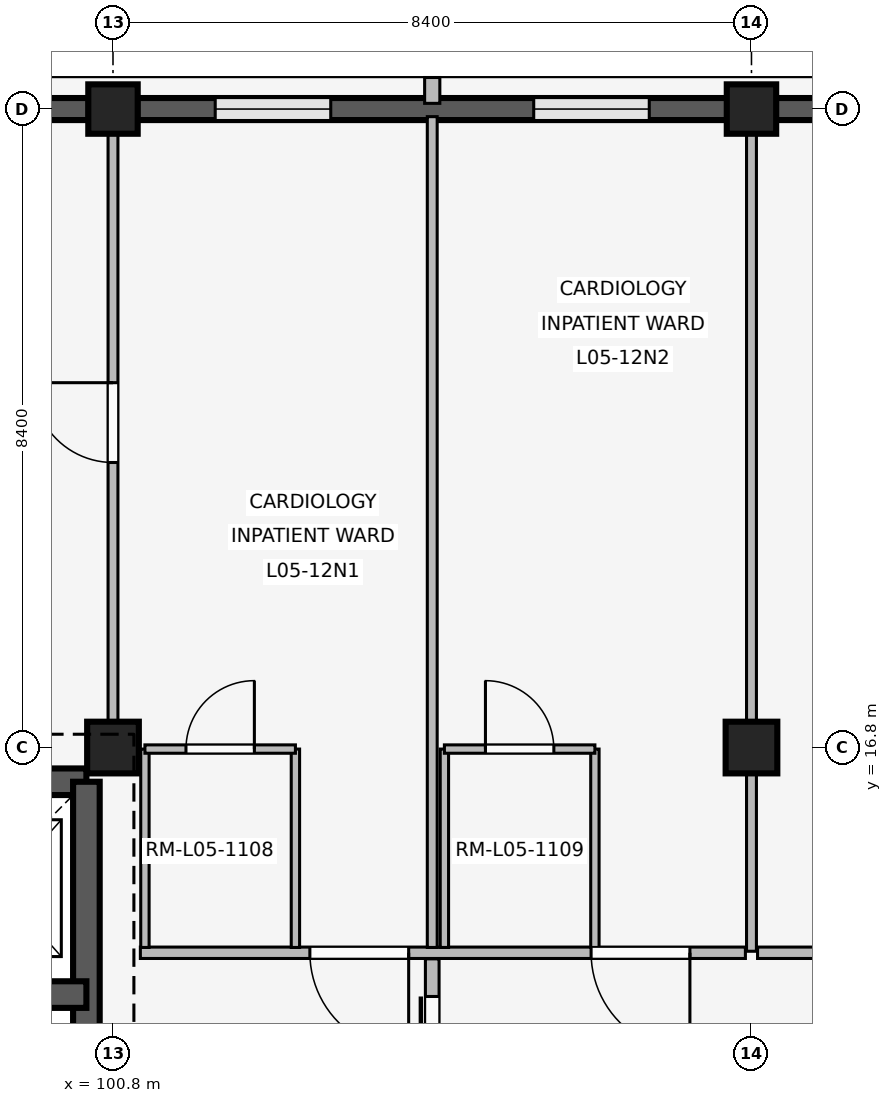
"""IFC4 building model, lengths in metres.
Left out: names, types, materials, properties, quantities, classifications, styles, units other than length and angle.
Written with IfcOpenShell. Run it as: python <this file> out.ifc"""

import sys

from ifc_helpers import new_model, si_unit, direction, frame, frame_2d, origin, origin_2d, place, context, subcontext, project, spatial, rectangle, extrude, element, fill, save


model = new_model("IFC4")
c1 = context("Model", 3, precision=1e-05, world=origin(), true_north=direction((0.0, 1.0)))
c2 = subcontext(c1, "Body", "Model", "MODEL_VIEW")
j1 = project(units=[si_unit("LENGTHUNIT", "METRE"), si_unit("PLANEANGLEUNIT", "RADIAN")], contexts=[c1])
p1 = place(None, origin())
s1 = spatial("IfcSite", under=j1, at=p1, CompositionType="ELEMENT")
p2 = place(p1, origin())
s2 = spatial("IfcBuilding", under=s1, at=p2, CompositionType="ELEMENT")
p3 = place(p2, frame((0.0, 0.0, 20.4)))
s3 = spatial("IfcBuildingStorey", under=s2, at=p3, CompositionType="ELEMENT", Elevation=20.4)
p4 = place(p3, frame((100.8, 16.8, 0.0), z_axis=(0.0, 0.0, 1.0), x_axis=(1.0, 0.0, 0.0)))
e1 = element("IfcColumn", 1, at=p4, inside=s3, PredefinedType="COLUMN", context=c2, shape_type="SweptSolid", body=[
    extrude(rectangle(XDim=0.68, YDim=0.68, at=origin_2d()), origin(), (0.0, 0.0, 1.0), 4.2),
])
p5 = place(p3, frame((100.8, 25.2, 0.0), z_axis=(0.0, 0.0, 1.0), x_axis=(1.0, 0.0, 0.0)))
e2 = element("IfcColumn", 2, at=p5, inside=s3, PredefinedType="COLUMN", context=c2, shape_type="SweptSolid", body=[
    extrude(rectangle(XDim=0.65, YDim=0.65, at=origin_2d()), origin(), (0.0, 0.0, 1.0), 4.2),
])
p6 = place(p3, frame((109.2, 16.8, 0.0), z_axis=(0.0, 0.0, 1.0), x_axis=(1.0, 0.0, 0.0)))
e3 = element("IfcColumn", 3, at=p6, inside=s3, PredefinedType="COLUMN", context=c2, shape_type="SweptSolid", body=[
    extrude(rectangle(XDim=0.68, YDim=0.68, at=origin_2d()), origin(), (0.0, 0.0, 1.0), 4.2),
])
p7 = place(p3, frame((109.2, 25.2, 0.0), z_axis=(0.0, 0.0, 1.0), x_axis=(1.0, 0.0, 0.0)))
e4 = element("IfcColumn", 4, at=p7, inside=s3, PredefinedType="COLUMN", context=c2, shape_type="SweptSolid", body=[
    extrude(rectangle(XDim=0.65, YDim=0.65, at=origin_2d()), origin(), (0.0, 0.0, 1.0), 4.2),
])
p8 = place(p3, frame((92.72, 25.2, 0.0), z_axis=(0.0, 0.0, 1.0), x_axis=(1.0, 0.0, 0.0)))
e5 = element("IfcWall", 5, at=p8, inside=s3, PredefinedType="SOLIDWALL", context=c2, shape_type="SweptSolid", body=[
    extrude(rectangle(XDim=7.76, YDim=0.29, at=frame_2d((3.88, 0.0))), origin(), (0.0, 0.0, 1.0), 3.34),
])
p9 = place(p8, frame((0.985, 0.0, 0.85)))
e6 = element("IfcOpeningElement", 6, at=p9, cuts=e5, PredefinedType="OPENING", context=c2, shape_type="SweptSolid", body=[
    extrude(rectangle(XDim=1.6, YDim=1.65, at=frame_2d((0.8, 0.825))), frame((0.0, 0.155, 0.0), z_axis=(0.0, -1.0, 0.0), x_axis=(1.0, 0.0, 0.0)), (0.0, 0.0, 1.0), 0.31),
])
p10 = place(p8, frame((5.175, 0.0, 0.85)))
e7 = element("IfcOpeningElement", 7, at=p10, cuts=e5, PredefinedType="OPENING", context=c2, shape_type="SweptSolid", body=[
    extrude(rectangle(XDim=1.6, YDim=1.65, at=frame_2d((0.8, 0.825))), frame((0.0, 0.155, 0.0), z_axis=(0.0, -1.0, 0.0), x_axis=(1.0, 0.0, 0.0)), (0.0, 0.0, 1.0), 0.31),
])
p11 = place(p3, frame((101.12, 25.2, 0.0), z_axis=(0.0, 0.0, 1.0), x_axis=(1.0, 0.0, 0.0)))
e8 = element("IfcWall", 8, at=p11, inside=s3, PredefinedType="SOLIDWALL", context=c2, shape_type="SweptSolid", body=[
    extrude(rectangle(XDim=7.76, YDim=0.29, at=frame_2d((3.88, 0.0))), origin(), (0.0, 0.0, 1.0), 3.34),
])
p12 = place(p11, frame((1.025, 0.0, 0.85)))
e9 = element("IfcOpeningElement", 9, at=p12, cuts=e8, PredefinedType="OPENING", context=c2, shape_type="SweptSolid", body=[
    extrude(rectangle(XDim=1.52, YDim=1.65, at=frame_2d((0.76, 0.825))), frame((0.0, 0.155, 0.0), z_axis=(0.0, -1.0, 0.0), x_axis=(1.0, 0.0, 0.0)), (0.0, 0.0, 1.0), 0.31),
])
p13 = place(p11, frame((5.215, 0.0, 0.85)))
e10 = element("IfcOpeningElement", 10, at=p13, cuts=e8, PredefinedType="OPENING", context=c2, shape_type="SweptSolid", body=[
    extrude(rectangle(XDim=1.52, YDim=1.65, at=frame_2d((0.76, 0.825))), frame((0.0, 0.155, 0.0), z_axis=(0.0, -1.0, 0.0), x_axis=(1.0, 0.0, 0.0)), (0.0, 0.0, 1.0), 0.31),
])
p14 = place(p3, frame((105.0, 25.275, 0.0), z_axis=(0.0, 0.0, 1.0), x_axis=(0.0, 1.0, 0.0)))
e11 = element("IfcWall", 11, at=p14, inside=s3, PredefinedType="ELEMENTEDWALL", context=c2, shape_type="SweptSolid", body=[
    extrude(rectangle(XDim=0.34, YDim=0.2, at=frame_2d((0.17, 0.0))), origin(), (0.0, 0.0, 1.0), 3.32),
])
p15 = place(p3, frame((109.52, 25.2, 0.0), z_axis=(0.0, 0.0, 1.0), x_axis=(1.0, 0.0, 0.0)))
e12 = element("IfcWall", 12, at=p15, inside=s3, PredefinedType="SOLIDWALL", context=c2, shape_type="SweptSolid", body=[
    extrude(rectangle(XDim=7.76, YDim=0.29, at=frame_2d((3.88, 0.0))), origin(), (0.0, 0.0, 1.0), 3.34),
])
p16 = place(p15, frame((1.11, 0.0, 0.85)))
e13 = element("IfcOpeningElement", 13, at=p16, cuts=e12, PredefinedType="OPENING", context=c2, shape_type="SweptSolid", body=[
    extrude(rectangle(XDim=1.35, YDim=1.55, at=frame_2d((0.675, 0.775))), frame((0.0, 0.155, 0.0), z_axis=(0.0, -1.0, 0.0), x_axis=(1.0, 0.0, 0.0)), (0.0, 0.0, 1.0), 0.31),
])
p17 = place(p15, frame((5.3, 0.0, 0.85)))
e14 = element("IfcOpeningElement", 14, at=p17, cuts=e12, PredefinedType="OPENING", context=c2, shape_type="SweptSolid", body=[
    extrude(rectangle(XDim=1.35, YDim=1.55, at=frame_2d((0.675, 0.775))), frame((0.0, 0.155, 0.0), z_axis=(0.0, -1.0, 0.0), x_axis=(1.0, 0.0, 0.0)), (0.0, 0.0, 1.0), 0.31),
])
p18 = place(p3, frame((92.95, 16.35, 0.0), z_axis=(0.0, 0.0, 1.0), x_axis=(1.0, 0.0, 0.0)))
e15 = element("IfcWall", 15, at=p18, inside=s3, PredefinedType="SHEAR", context=c2, shape_type="SweptSolid", body=[
    extrude(rectangle(XDim=7.5, YDim=0.35, at=frame_2d((3.75, 0.0))), origin(), (0.0, 0.0, 1.0), 3.92),
])
p19 = place(p3, frame((100.45, 8.8, 0.0), z_axis=(0.0, 0.0, 1.0), x_axis=(0.0, 1.0, 0.0)))
e16 = element("IfcWall", 16, at=p19, inside=s3, PredefinedType="SHEAR", context=c2, shape_type="SweptSolid", body=[
    extrude(rectangle(XDim=7.55, YDim=0.35, at=frame_2d((3.775, 0.0))), origin(), (0.0, 0.0, 1.0), 3.92),
])
p20 = place(p19, frame((2.4, 0.0, 0.0)))
e17 = element("IfcOpeningElement", 17, at=p20, cuts=e16, PredefinedType="OPENING", context=c2, shape_type="SweptSolid", body=[
    extrude(rectangle(XDim=1.2, YDim=2.2, at=frame_2d((0.6, 1.1))), frame((0.0, 0.185, 0.0), z_axis=(0.0, -1.0, 0.0), x_axis=(1.0, 0.0, 0.0)), (0.0, 0.0, 1.0), 0.37),
])
p21 = place(p3, frame((96.65, 13.55, 0.0), z_axis=(0.0, 0.0, 1.0), x_axis=(1.0, 0.0, 0.0)))
e18 = element("IfcWall", 18, at=p21, inside=s3, PredefinedType="SHEAR", context=c2, shape_type="SweptSolid", body=[
    extrude(rectangle(XDim=3.8, YDim=0.35, at=frame_2d((1.9, 0.0))), origin(), (0.0, 0.0, 1.0), 3.92),
])
p22 = place(p21, frame((0.32, 0.0, 0.0)))
e19 = element("IfcOpeningElement", 19, at=p22, cuts=e18, PredefinedType="OPENING", context=c2, shape_type="SweptSolid", body=[
    extrude(rectangle(XDim=1.4, YDim=2.25, at=frame_2d((0.7, 1.125))), frame((0.0, 0.185, 0.0), z_axis=(0.0, -1.0, 0.0), x_axis=(1.0, 0.0, 0.0)), (0.0, 0.0, 1.0), 0.37),
])
p23 = place(p21, frame((2.04, 0.0, 0.0)))
e20 = element("IfcOpeningElement", 20, at=p23, cuts=e18, PredefinedType="OPENING", context=c2, shape_type="SweptSolid", body=[
    extrude(rectangle(XDim=1.1, YDim=2.15, at=frame_2d((0.55, 1.075))), frame((0.0, 0.185, 0.0), z_axis=(0.0, -1.0, 0.0), x_axis=(1.0, 0.0, 0.0)), (0.0, 0.0, 1.0), 0.37),
])
p24 = place(p3, frame((100.8, 17.15, 0.0), z_axis=(0.0, 0.0, 1.0), x_axis=(0.0, 1.0, 0.0)))
e21 = element("IfcWall", 21, at=p24, inside=s3, PredefinedType="PARTITIONING", context=c2, shape_type="SweptSolid", body=[
    extrude(rectangle(XDim=7.91, YDim=0.13, at=frame_2d((3.955, 0.0))), origin(), (0.0, 0.0, 1.0), 3.32),
])
p25 = place(p24, frame((3.4, 0.0, 0.0)))
e22 = element("IfcOpeningElement", 22, at=p25, cuts=e21, PredefinedType="OPENING", context=c2, shape_type="SweptSolid", body=[
    extrude(rectangle(XDim=1.05, YDim=2.2, at=frame_2d((0.525, 1.1))), frame((0.0, 0.075, 0.0), z_axis=(0.0, -1.0, 0.0), x_axis=(1.0, 0.0, 0.0)), (0.0, 0.0, 1.0), 0.15),
])
p26 = place(p3, frame((109.12, 14.1, 0.0), z_axis=(0.0, 0.0, 1.0), x_axis=(-1.0, 0.0, 0.0)))
e23 = element("IfcWall", 23, at=p26, inside=s3, PredefinedType="PARTITIONING", context=c2, shape_type="SweptSolid", body=[
    extrude(rectangle(XDim=7.96, YDim=0.15, at=frame_2d((3.98, 0.0))), origin(), (0.0, 0.0, 1.0), 3.32),
])
p27 = place(p26, frame((0.73, 0.0, 0.0)))
e24 = element("IfcOpeningElement", 24, at=p27, cuts=e23, PredefinedType="OPENING", context=c2, shape_type="SweptSolid", body=[
    extrude(rectangle(XDim=1.3, YDim=2.25, at=frame_2d((0.65, 1.125))), frame((0.0, 0.085, 0.0), z_axis=(0.0, -1.0, 0.0), x_axis=(1.0, 0.0, 0.0)), (0.0, 0.0, 1.0), 0.17),
])
p28 = place(p26, frame((4.43, 0.0, 0.0)))
e25 = element("IfcOpeningElement", 25, at=p28, cuts=e23, PredefinedType="OPENING", context=c2, shape_type="SweptSolid", body=[
    extrude(rectangle(XDim=1.3, YDim=2.25, at=frame_2d((0.65, 1.125))), frame((0.0, 0.085, 0.0), z_axis=(0.0, -1.0, 0.0), x_axis=(1.0, 0.0, 0.0)), (0.0, 0.0, 1.0), 0.17),
])
p29 = place(p3, frame((105.0, 14.17, 0.0), z_axis=(0.0, 0.0, 1.0), x_axis=(0.0, 1.0, 0.0)))
e26 = element("IfcWall", 26, at=p29, inside=s3, PredefinedType="PARTITIONING", context=c2, shape_type="SweptSolid", body=[
    extrude(rectangle(XDim=10.93, YDim=0.13, at=frame_2d((5.465, 0.0))), origin(), (0.0, 0.0, 1.0), 3.32),
])
for number, where, z_axis, x_axis in (
    (27, (101.22, 14.17, 0.0), (0.0, 0.0, 1.0), (0.0, 1.0, 0.0)),
    (28, (103.2, 14.17, 0.0), (0.0, 0.0, 1.0), (0.0, 1.0, 0.0)),
):
    element("IfcWall", number, at=place(p3, frame(where, z_axis=z_axis, x_axis=x_axis)), inside=s3, PredefinedType="PARTITIONING", context=c2, shape_type="SweptSolid", body=[
        extrude(rectangle(XDim=2.61, YDim=0.11, at=frame_2d((1.305, 0.0))), origin(), (0.0, 0.0, 1.0), 3.32),
    ])
p30 = place(p3, frame((101.22, 16.78, 0.0), z_axis=(0.0, 0.0, 1.0), x_axis=(1.0, 0.0, 0.0)))
e29 = element("IfcWall", 29, at=p30, inside=s3, PredefinedType="PARTITIONING", context=c2, shape_type="SweptSolid", body=[
    extrude(rectangle(XDim=1.98, YDim=0.11, at=frame_2d((0.99, 0.0))), origin(), (0.0, 0.0, 1.0), 3.32),
])
p31 = place(p30, frame((0.54, 0.0, 0.0)))
e30 = element("IfcOpeningElement", 30, at=p31, cuts=e29, PredefinedType="OPENING", context=c2, shape_type="SweptSolid", body=[
    extrude(rectangle(XDim=0.9, YDim=2.1, at=frame_2d((0.45, 1.05))), frame((0.0, 0.065, 0.0), z_axis=(0.0, -1.0, 0.0), x_axis=(1.0, 0.0, 0.0)), (0.0, 0.0, 1.0), 0.13),
])
for number, where, z_axis, x_axis in (
    (31, (105.16, 14.17, 0.0), (0.0, 0.0, 1.0), (0.0, 1.0, 0.0)),
    (32, (107.14, 14.17, 0.0), (0.0, 0.0, 1.0), (0.0, 1.0, 0.0)),
):
    element("IfcWall", number, at=place(p3, frame(where, z_axis=z_axis, x_axis=x_axis)), inside=s3, PredefinedType="PARTITIONING", context=c2, shape_type="SweptSolid", body=[
        extrude(rectangle(XDim=2.61, YDim=0.11, at=frame_2d((1.305, 0.0))), origin(), (0.0, 0.0, 1.0), 3.32),
    ])
p32 = place(p3, frame((105.16, 16.78, 0.0), z_axis=(0.0, 0.0, 1.0), x_axis=(1.0, 0.0, 0.0)))
e33 = element("IfcWall", 33, at=p32, inside=s3, PredefinedType="PARTITIONING", context=c2, shape_type="SweptSolid", body=[
    extrude(rectangle(XDim=1.98, YDim=0.11, at=frame_2d((0.99, 0.0))), origin(), (0.0, 0.0, 1.0), 3.32),
])
p33 = place(p32, frame((0.54, 0.0, 0.0)))
e34 = element("IfcOpeningElement", 34, at=p33, cuts=e33, PredefinedType="OPENING", context=c2, shape_type="SweptSolid", body=[
    extrude(rectangle(XDim=0.9, YDim=2.1, at=frame_2d((0.45, 1.05))), frame((0.0, 0.065, 0.0), z_axis=(0.0, -1.0, 0.0), x_axis=(1.0, 0.0, 0.0)), (0.0, 0.0, 1.0), 0.13),
])
p34 = place(p3, frame((105.0, 11.18, 0.0), z_axis=(0.0, 0.0, 1.0), x_axis=(0.0, 1.0, 0.0)))
e35 = element("IfcWall", 35, at=p34, inside=s3, PredefinedType="PARTITIONING", context=c2, shape_type="SweptSolid", body=[
    extrude(rectangle(XDim=2.84, YDim=0.18, at=frame_2d((1.42, 0.0))), origin(), (0.0, 0.0, 1.0), 3.32),
])
p35 = place(p34, frame((0.495, 0.0, 0.0)))
e36 = element("IfcOpeningElement", 36, at=p35, cuts=e35, PredefinedType="OPENING", context=c2, shape_type="SweptSolid", body=[
    extrude(rectangle(XDim=1.85, YDim=2.3, at=frame_2d((0.925, 1.15))), frame((0.0, 0.1, 0.0), z_axis=(0.0, -1.0, 0.0), x_axis=(1.0, 0.0, 0.0)), (0.0, 0.0, 1.0), 0.2),
])
p36 = place(p3, frame((109.2, 14.12, 0.0), z_axis=(0.0, 0.0, 1.0), x_axis=(0.0, 1.0, 0.0)))
e37 = element("IfcWall", 37, at=p36, inside=s3, PredefinedType="PARTITIONING", context=c2, shape_type="SweptSolid", body=[
    extrude(rectangle(XDim=10.94, YDim=0.13, at=frame_2d((5.47, 0.0))), origin(), (0.0, 0.0, 1.0), 3.32),
])
p37 = place(p3, frame((117.46, 14.1, 0.0), z_axis=(0.0, 0.0, 1.0), x_axis=(-1.0, 0.0, 0.0)))
e38 = element("IfcWall", 38, at=p37, inside=s3, PredefinedType="PARTITIONING", context=c2, shape_type="SweptSolid", body=[
    extrude(rectangle(XDim=8.18, YDim=0.15, at=frame_2d((4.09, 0.0))), origin(), (0.0, 0.0, 1.0), 3.32),
])
p38 = place(p37, frame((3.465, 0.0, 0.0)))
e39 = element("IfcOpeningElement", 39, at=p38, cuts=e38, PredefinedType="OPENING", context=c2, shape_type="SweptSolid", body=[
    extrude(rectangle(XDim=1.25, YDim=2.2, at=frame_2d((0.625, 1.1))), frame((0.0, 0.085, 0.0), z_axis=(0.0, -1.0, 0.0), x_axis=(1.0, 0.0, 0.0)), (0.0, 0.0, 1.0), 0.17),
])
p39 = place(p12, origin())
e40 = element("IfcWindow", 40, at=p39, inside=s3, PartitioningType="SINGLE_PANEL", PredefinedType="WINDOW", context=c2, shape_type="SweptSolid", body=[
    extrude(rectangle(XDim=1.52, YDim=1.65, at=frame_2d((0.76, 0.825))), frame((0.0, 0.03, 0.0), z_axis=(0.0, -1.0, 0.0), x_axis=(1.0, 0.0, 0.0)), (0.0, 0.0, 1.0), 0.06),
])
fill(e9, e40)
p40 = place(p13, origin())
e41 = element("IfcWindow", 41, at=p40, inside=s3, PartitioningType="SINGLE_PANEL", PredefinedType="WINDOW", context=c2, shape_type="SweptSolid", body=[
    extrude(rectangle(XDim=1.52, YDim=1.65, at=frame_2d((0.76, 0.825))), frame((0.0, 0.03, 0.0), z_axis=(0.0, -1.0, 0.0), x_axis=(1.0, 0.0, 0.0)), (0.0, 0.0, 1.0), 0.06),
])
fill(e10, e41)
p41 = place(p25, origin())
e42 = element("IfcDoor", 42, at=p41, inside=s3, OperationType="SINGLE_SWING_RIGHT", PredefinedType="DOOR", context=c2, shape_type="SweptSolid", body=[
    extrude(rectangle(XDim=1.05, YDim=2.2, at=frame_2d((0.525, 1.1))), frame((0.0, 0.025, 0.0), z_axis=(0.0, -1.0, 0.0), x_axis=(1.0, 0.0, 0.0)), (0.0, 0.0, 1.0), 0.05),
])
fill(e22, e42)
p42 = place(p27, origin())
e43 = element("IfcDoor", 43, at=p42, inside=s3, OperationType="SINGLE_SWING_LEFT", PredefinedType="DOOR", context=c2, shape_type="SweptSolid", body=[
    extrude(rectangle(XDim=1.3, YDim=2.25, at=frame_2d((0.65, 1.125))), frame((0.0, 0.025, 0.0), z_axis=(0.0, -1.0, 0.0), x_axis=(1.0, 0.0, 0.0)), (0.0, 0.0, 1.0), 0.05),
])
fill(e24, e43)
p43 = place(p28, origin())
e44 = element("IfcDoor", 44, at=p43, inside=s3, OperationType="SINGLE_SWING_LEFT", PredefinedType="DOOR", context=c2, shape_type="SweptSolid", body=[
    extrude(rectangle(XDim=1.3, YDim=2.25, at=frame_2d((0.65, 1.125))), frame((0.0, 0.025, 0.0), z_axis=(0.0, -1.0, 0.0), x_axis=(1.0, 0.0, 0.0)), (0.0, 0.0, 1.0), 0.05),
])
fill(e25, e44)
p44 = place(p31, origin())
e45 = element("IfcDoor", 45, at=p44, inside=s3, OperationType="SINGLE_SWING_RIGHT", PredefinedType="DOOR", context=c2, shape_type="SweptSolid", body=[
    extrude(rectangle(XDim=0.9, YDim=2.1, at=frame_2d((0.45, 1.05))), frame((0.0, 0.025, 0.0), z_axis=(0.0, -1.0, 0.0), x_axis=(1.0, 0.0, 0.0)), (0.0, 0.0, 1.0), 0.05),
])
fill(e30, e45)
p45 = place(p33, origin())
e46 = element("IfcDoor", 46, at=p45, inside=s3, OperationType="SINGLE_SWING_LEFT", PredefinedType="DOOR", context=c2, shape_type="SweptSolid", body=[
    extrude(rectangle(XDim=0.9, YDim=2.1, at=frame_2d((0.45, 1.05))), frame((0.0, 0.025, 0.0), z_axis=(0.0, -1.0, 0.0), x_axis=(1.0, 0.0, 0.0)), (0.0, 0.0, 1.0), 0.05),
])
fill(e34, e46)
p46 = place(p35, origin())
e47 = element("IfcDoor", 47, at=p46, inside=s3, OperationType="SLIDING_TO_LEFT", PredefinedType="DOOR", context=c2, shape_type="SweptSolid", body=[
    extrude(rectangle(XDim=1.85, YDim=2.3, at=frame_2d((0.925, 1.15))), frame((0.0, 0.025, 0.0), z_axis=(0.0, -1.0, 0.0), x_axis=(1.0, 0.0, 0.0)), (0.0, 0.0, 1.0), 0.05),
])
fill(e36, e47)
save(model, sys.argv[1])
